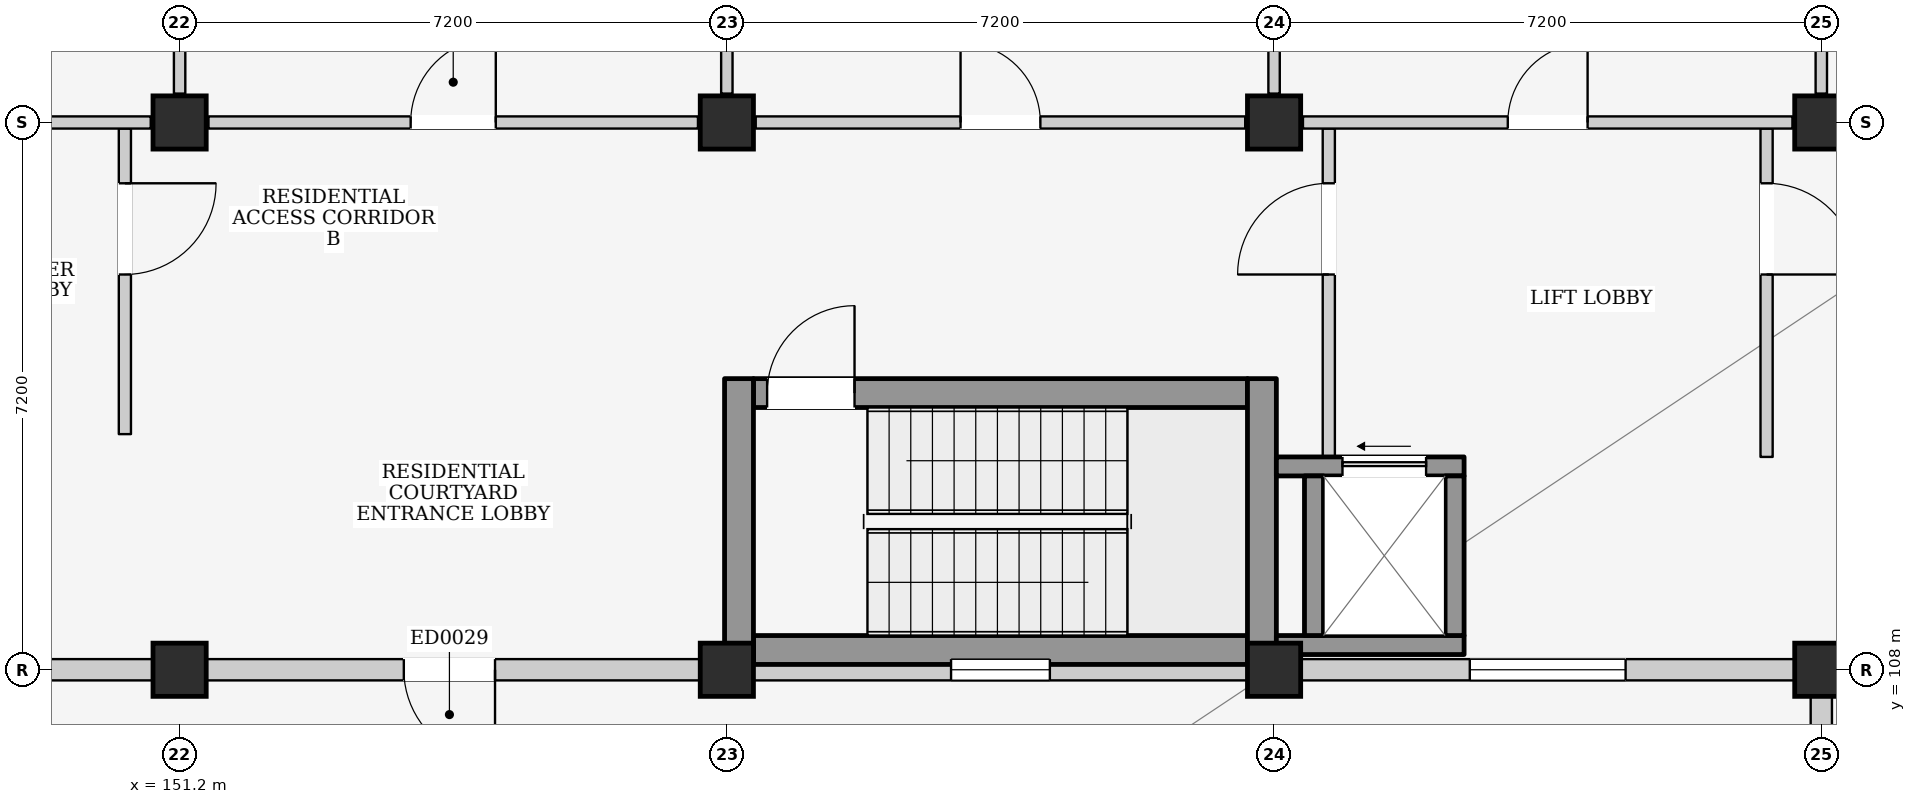
"""IFC4 building model, lengths in metres.
Left out: names, types, materials, properties, quantities, classifications, styles, units other than length and angle.
Written with IfcOpenShell. Run it as: python <this file> out.ifc"""

import sys

from ifc_helpers import new_model, si_unit, direction, frame, frame_2d, origin, origin_2d, place, context, subcontext, project, spatial, rectangle, extrude, element, fill, save


model = new_model("IFC4")
c1 = context("Model", 3, precision=1e-05, world=origin(), true_north=direction((0.0, 1.0)))
c2 = subcontext(c1, "Body", "Model", "MODEL_VIEW")
j1 = project(units=[si_unit("LENGTHUNIT", "METRE"), si_unit("PLANEANGLEUNIT", "RADIAN")], contexts=[c1])
p1 = place(None, origin())
s1 = spatial("IfcSite", under=j1, at=p1, CompositionType="ELEMENT")
p2 = place(p1, origin())
s2 = spatial("IfcBuilding", under=s1, at=p2, CompositionType="ELEMENT")
p3 = place(p2, origin())
s3 = spatial("IfcBuildingStorey", under=s2, at=p3, CompositionType="ELEMENT", Elevation=0.0)
for number, where, z_axis, x_axis in (
    (1, (151.2, 108.0, 0.0), (0.0, 0.0, 1.0), (1.0, 0.0, 0.0)),
    (2, (151.2, 115.2, 0.0), (0.0, 0.0, 1.0), (1.0, 0.0, 0.0)),
    (3, (158.4, 108.0, 0.0), (0.0, 0.0, 1.0), (1.0, 0.0, 0.0)),
    (4, (158.4, 115.2, 0.0), (0.0, 0.0, 1.0), (1.0, 0.0, 0.0)),
    (5, (165.6, 108.0, 0.0), (0.0, 0.0, 1.0), (1.0, 0.0, 0.0)),
    (6, (165.6, 115.2, 0.0), (0.0, 0.0, 1.0), (1.0, 0.0, 0.0)),
    (7, (172.8, 108.0, 0.0), (0.0, 0.0, 1.0), (1.0, 0.0, 0.0)),
    (8, (172.8, 115.2, 0.0), (0.0, 0.0, 1.0), (1.0, 0.0, 0.0)),
):
    element("IfcColumn", number, at=place(p3, frame(where, z_axis=z_axis, x_axis=x_axis)), inside=s3, PredefinedType="COLUMN", context=c2, shape_type="SweptSolid", body=[
        extrude(rectangle(XDim=0.7, YDim=0.7, at=origin_2d()), origin(), (0.0, 0.0, 1.0), 4.5),
    ])
p4 = place(p3, frame((144.35, 108.0, 0.0), z_axis=(0.0, 0.0, 1.0), x_axis=(1.0, 0.0, 0.0)))
e9 = element("IfcWall", 9, at=p4, inside=s3, PredefinedType="ELEMENTEDWALL", context=c2, shape_type="SweptSolid", body=[
    extrude(rectangle(XDim=6.5, YDim=0.28, at=frame_2d((3.25, 0.0))), origin(), (0.0, 0.0, 1.0), 3.435),
])
p5 = place(p4, frame((2.475, 0.0, 0.95)))
e10 = element("IfcOpeningElement", 10, at=p5, cuts=e9, PredefinedType="OPENING", context=c2, shape_type="SweptSolid", body=[
    extrude(rectangle(XDim=1.55, YDim=1.45, at=frame_2d((0.775, 0.725))), frame((0.0, 0.155, 0.0), z_axis=(0.0, -1.0, 0.0), x_axis=(1.0, 0.0, 0.0)), (0.0, 0.0, 1.0), 0.31),
])
p6 = place(p3, frame((151.55, 108.0, 0.0), z_axis=(0.0, 0.0, 1.0), x_axis=(1.0, 0.0, 0.0)))
e11 = element("IfcWall", 11, at=p6, inside=s3, PredefinedType="ELEMENTEDWALL", context=c2, shape_type="SweptSolid", body=[
    extrude(rectangle(XDim=6.5, YDim=0.28, at=frame_2d((3.25, 0.0))), origin(), (0.0, 0.0, 1.0), 3.435),
])
p7 = place(p6, frame((2.6, 0.0, 0.0)))
e12 = element("IfcOpeningElement", 12, at=p7, cuts=e11, PredefinedType="OPENING", context=c2, shape_type="SweptSolid", body=[
    extrude(rectangle(XDim=1.2, YDim=2.15, at=frame_2d((0.6, 1.075))), frame((0.0, 0.155, 0.0), z_axis=(0.0, -1.0, 0.0), x_axis=(1.0, 0.0, 0.0)), (0.0, 0.0, 1.0), 0.31),
])
p8 = place(p3, frame((158.75, 108.0, 0.0), z_axis=(0.0, 0.0, 1.0), x_axis=(1.0, 0.0, 0.0)))
e13 = element("IfcWall", 13, at=p8, inside=s3, PredefinedType="ELEMENTEDWALL", context=c2, shape_type="SweptSolid", body=[
    extrude(rectangle(XDim=6.5, YDim=0.28, at=frame_2d((3.25, 0.0))), origin(), (0.0, 0.0, 1.0), 3.435),
])
p9 = place(p8, frame((2.6, 0.0, 0.95)))
e14 = element("IfcOpeningElement", 14, at=p9, cuts=e13, PredefinedType="OPENING", context=c2, shape_type="SweptSolid", body=[
    extrude(rectangle(XDim=1.3, YDim=1.25, at=frame_2d((0.65, 0.625))), frame((0.0, 0.155, 0.0), z_axis=(0.0, -1.0, 0.0), x_axis=(1.0, 0.0, 0.0)), (0.0, 0.0, 1.0), 0.31),
])
p10 = place(p3, frame((165.95, 108.0, 0.0), z_axis=(0.0, 0.0, 1.0), x_axis=(1.0, 0.0, 0.0)))
e15 = element("IfcWall", 15, at=p10, inside=s3, PredefinedType="ELEMENTEDWALL", context=c2, shape_type="SweptSolid", body=[
    extrude(rectangle(XDim=6.5, YDim=0.28, at=frame_2d((3.25, 0.0))), origin(), (0.0, 0.0, 1.0), 3.435),
])
p11 = place(p10, frame((2.225, 0.0, 0.95)))
e16 = element("IfcOpeningElement", 16, at=p11, cuts=e15, PredefinedType="OPENING", context=c2, shape_type="SweptSolid", body=[
    extrude(rectangle(XDim=2.05, YDim=1.6, at=frame_2d((1.025, 0.8))), frame((0.0, 0.155, 0.0), z_axis=(0.0, -1.0, 0.0), x_axis=(1.0, 0.0, 0.0)), (0.0, 0.0, 1.0), 0.31),
])
p12 = place(p3, frame((172.8, 101.15, 0.0), z_axis=(0.0, 0.0, 1.0), x_axis=(0.0, 1.0, 0.0)))
e17 = element("IfcWall", 17, at=p12, inside=s3, PredefinedType="ELEMENTEDWALL", context=c2, shape_type="SweptSolid", body=[
    extrude(rectangle(XDim=6.5, YDim=0.28, at=frame_2d((3.25, 0.0))), origin(), (0.0, 0.0, 1.0), 3.435),
])
p13 = place(p12, frame((2.225, 0.0, 0.95)))
e18 = element("IfcOpeningElement", 18, at=p13, cuts=e17, PredefinedType="OPENING", context=c2, shape_type="SweptSolid", body=[
    extrude(rectangle(XDim=2.05, YDim=1.6, at=frame_2d((1.025, 0.8))), frame((0.0, 0.155, 0.0), z_axis=(0.0, -1.0, 0.0), x_axis=(1.0, 0.0, 0.0)), (0.0, 0.0, 1.0), 0.31),
])
p14 = place(p3, frame((150.48, 111.1, 0.0), z_axis=(0.0, 0.0, 1.0), x_axis=(0.0, 1.0, 0.0)))
e19 = element("IfcWall", 19, at=p14, inside=s3, PredefinedType="PARTITIONING", context=c2, shape_type="SweptSolid", body=[
    extrude(rectangle(XDim=4.02, YDim=0.16, at=frame_2d((2.01, 0.0))), origin(), (0.0, 0.0, 1.0), 4.2),
])
p15 = place(p14, frame((2.1, 0.0, 0.0)))
e20 = element("IfcOpeningElement", 20, at=p15, cuts=e19, PredefinedType="OPENING", context=c2, shape_type="SweptSolid", body=[
    extrude(rectangle(XDim=1.2, YDim=2.2, at=frame_2d((0.6, 1.1))), frame((0.0, 0.095, 0.0), z_axis=(0.0, -1.0, 0.0), x_axis=(1.0, 0.0, 0.0)), (0.0, 0.0, 1.0), 0.19),
])
p16 = place(p3, frame((158.75, 108.26, 0.0), z_axis=(0.0, 0.0, 1.0), x_axis=(1.0, 0.0, 0.0)))
e21 = element("IfcWall", 21, at=p16, inside=s3, PredefinedType="SHEAR", context=c2, shape_type="SweptSolid", body=[
    extrude(rectangle(XDim=6.5, YDim=0.38, at=frame_2d((3.25, 0.0))), origin(), (0.0, 0.0, 1.0), 4.2),
])
p17 = place(p3, frame((158.75, 111.64, 0.0), z_axis=(0.0, 0.0, 1.0), x_axis=(1.0, 0.0, 0.0)))
e22 = element("IfcWall", 22, at=p17, inside=s3, PredefinedType="SHEAR", context=c2, shape_type="SweptSolid", body=[
    extrude(rectangle(XDim=6.5, YDim=0.38, at=frame_2d((3.25, 0.0))), origin(), (0.0, 0.0, 1.0), 4.2),
])
p18 = place(p17, frame((0.18, 0.0, 0.0)))
e23 = element("IfcOpeningElement", 23, at=p18, cuts=e22, PredefinedType="OPENING", context=c2, shape_type="SweptSolid", body=[
    extrude(rectangle(XDim=1.15, YDim=2.2, at=frame_2d((0.575, 1.1))), frame((0.0, 0.205, 0.0), z_axis=(0.0, -1.0, 0.0), x_axis=(1.0, 0.0, 0.0)), (0.0, 0.0, 1.0), 0.41),
])
for number, where, z_axis, x_axis in (
    (24, (158.56, 108.07, 0.0), (0.0, 0.0, 1.0), (0.0, 1.0, 0.0)),
    (25, (165.44, 108.07, 0.0), (0.0, 0.0, 1.0), (0.0, 1.0, 0.0)),
):
    element("IfcWall", number, at=place(p3, frame(where, z_axis=z_axis, x_axis=x_axis)), inside=s3, PredefinedType="SHEAR", context=c2, shape_type="SweptSolid", body=[
        extrude(rectangle(XDim=3.76, YDim=0.38, at=frame_2d((1.88, 0.0))), origin(), (0.0, 0.0, 1.0), 4.2),
    ])
p19 = place(p3, frame((166.32, 110.8, 0.0), z_axis=(0.0, 0.0, 1.0), x_axis=(0.0, 1.0, 0.0)))
e26 = element("IfcWall", 26, at=p19, inside=s3, PredefinedType="PARTITIONING", context=c2, shape_type="SweptSolid", body=[
    extrude(rectangle(XDim=4.32, YDim=0.16, at=frame_2d((2.16, 0.0))), origin(), (0.0, 0.0, 1.0), 4.2),
])
p20 = place(p19, frame((2.4, 0.0, 0.0)))
e27 = element("IfcOpeningElement", 27, at=p20, cuts=e26, PredefinedType="OPENING", context=c2, shape_type="SweptSolid", body=[
    extrude(rectangle(XDim=1.2, YDim=2.2, at=frame_2d((0.6, 1.1))), frame((0.0, 0.095, 0.0), z_axis=(0.0, -1.0, 0.0), x_axis=(1.0, 0.0, 0.0)), (0.0, 0.0, 1.0), 0.19),
])
p21 = place(p3, frame((172.08, 110.8, 0.0), z_axis=(0.0, 0.0, 1.0), x_axis=(0.0, 1.0, 0.0)))
e28 = element("IfcWall", 28, at=p21, inside=s3, PredefinedType="PARTITIONING", context=c2, shape_type="SweptSolid", body=[
    extrude(rectangle(XDim=4.32, YDim=0.16, at=frame_2d((2.16, 0.0))), origin(), (0.0, 0.0, 1.0), 4.2),
])
p22 = place(p21, frame((2.4, 0.0, 0.0)))
e29 = element("IfcOpeningElement", 29, at=p22, cuts=e28, PredefinedType="OPENING", context=c2, shape_type="SweptSolid", body=[
    extrude(rectangle(XDim=1.2, YDim=2.2, at=frame_2d((0.6, 1.1))), frame((0.0, 0.095, 0.0), z_axis=(0.0, -1.0, 0.0), x_axis=(1.0, 0.0, 0.0)), (0.0, 0.0, 1.0), 0.19),
])
p23 = place(p3, frame((165.63, 108.325, 0.0), z_axis=(0.0, 0.0, 1.0), x_axis=(1.0, 0.0, 0.0)))
e30 = element("IfcWall", 30, at=p23, inside=s3, PredefinedType="SHEAR", context=c2, shape_type="SweptSolid", body=[
    extrude(rectangle(XDim=2.47, YDim=0.25, at=frame_2d((1.235, 0.0))), origin(), (0.0, 0.0, 1.0), 4.2),
])
p24 = place(p3, frame((165.63, 110.675, 0.0), z_axis=(0.0, 0.0, 1.0), x_axis=(1.0, 0.0, 0.0)))
e31 = element("IfcWall", 31, at=p24, inside=s3, PredefinedType="SHEAR", context=c2, shape_type="SweptSolid", body=[
    extrude(rectangle(XDim=2.47, YDim=0.25, at=frame_2d((1.235, 0.0))), origin(), (0.0, 0.0, 1.0), 4.2),
])
p25 = place(p24, frame((0.87, 0.0, 0.0)))
e32 = element("IfcOpeningElement", 32, at=p25, cuts=e31, PredefinedType="OPENING", context=c2, shape_type="SweptSolid", body=[
    extrude(rectangle(XDim=1.1, YDim=2.15, at=frame_2d((0.55, 1.075))), frame((0.0, 0.14, 0.0), z_axis=(0.0, -1.0, 0.0), x_axis=(1.0, 0.0, 0.0)), (0.0, 0.0, 1.0), 0.28),
])
for number, where, z_axis, x_axis in (
    (33, (166.125, 108.45, 0.0), (0.0, 0.0, 1.0), (0.0, 1.0, 0.0)),
    (34, (167.975, 108.45, 0.0), (0.0, 0.0, 1.0), (0.0, 1.0, 0.0)),
):
    element("IfcWall", number, at=place(p3, frame(where, z_axis=z_axis, x_axis=x_axis)), inside=s3, PredefinedType="SHEAR", context=c2, shape_type="SweptSolid", body=[
        extrude(rectangle(XDim=2.1, YDim=0.25, at=frame_2d((1.05, 0.0))), origin(), (0.0, 0.0, 1.0), 4.2),
    ])
p26 = place(p3, frame((144.38, 115.2, 0.0), z_axis=(0.0, 0.0, 1.0), x_axis=(1.0, 0.0, 0.0)))
e35 = element("IfcWall", 35, at=p26, inside=s3, PredefinedType="PARTITIONING", context=c2, shape_type="SweptSolid", body=[
    extrude(rectangle(XDim=6.44, YDim=0.16, at=frame_2d((3.22, 0.0))), origin(), (0.0, 0.0, 1.0), 3.435),
])
p27 = place(p26, frame((2.66, 0.0, 0.0)))
e36 = element("IfcOpeningElement", 36, at=p27, cuts=e35, PredefinedType="OPENING", context=c2, shape_type="SweptSolid", body=[
    extrude(rectangle(XDim=1.12, YDim=2.2, at=frame_2d((0.56, 1.1))), frame((0.0, 0.095, 0.0), z_axis=(0.0, -1.0, 0.0), x_axis=(1.0, 0.0, 0.0)), (0.0, 0.0, 1.0), 0.19),
])
p28 = place(p3, frame((151.2, 115.58, 0.0), z_axis=(0.0, 0.0, 1.0), x_axis=(0.0, 1.0, 0.0)))
e37 = element("IfcWall", 37, at=p28, inside=s3, PredefinedType="PARTITIONING", context=c2, shape_type="SweptSolid", body=[
    extrude(rectangle(XDim=6.44, YDim=0.15, at=frame_2d((3.22, 0.0))), origin(), (0.0, 0.0, 1.0), 3.435),
])
p29 = place(p3, frame((151.58, 115.2, 0.0), z_axis=(0.0, 0.0, 1.0), x_axis=(1.0, 0.0, 0.0)))
e38 = element("IfcWall", 38, at=p29, inside=s3, PredefinedType="PARTITIONING", context=c2, shape_type="SweptSolid", body=[
    extrude(rectangle(XDim=6.44, YDim=0.16, at=frame_2d((3.22, 0.0))), origin(), (0.0, 0.0, 1.0), 3.435),
])
p30 = place(p29, frame((2.66, 0.0, 0.0)))
e39 = element("IfcOpeningElement", 39, at=p30, cuts=e38, PredefinedType="OPENING", context=c2, shape_type="SweptSolid", body=[
    extrude(rectangle(XDim=1.12, YDim=2.2, at=frame_2d((0.56, 1.1))), frame((0.0, 0.095, 0.0), z_axis=(0.0, -1.0, 0.0), x_axis=(1.0, 0.0, 0.0)), (0.0, 0.0, 1.0), 0.19),
])
p31 = place(p3, frame((158.4, 115.58, 0.0), z_axis=(0.0, 0.0, 1.0), x_axis=(0.0, 1.0, 0.0)))
e40 = element("IfcWall", 40, at=p31, inside=s3, PredefinedType="PARTITIONING", context=c2, shape_type="SweptSolid", body=[
    extrude(rectangle(XDim=6.44, YDim=0.15, at=frame_2d((3.22, 0.0))), origin(), (0.0, 0.0, 1.0), 3.435),
])
p32 = place(p3, frame((158.78, 115.2, 0.0), z_axis=(0.0, 0.0, 1.0), x_axis=(1.0, 0.0, 0.0)))
e41 = element("IfcWall", 41, at=p32, inside=s3, PredefinedType="PARTITIONING", context=c2, shape_type="SweptSolid", body=[
    extrude(rectangle(XDim=6.44, YDim=0.16, at=frame_2d((3.22, 0.0))), origin(), (0.0, 0.0, 1.0), 3.435),
])
p33 = place(p32, frame((2.695, 0.0, 0.0)))
e42 = element("IfcOpeningElement", 42, at=p33, cuts=e41, PredefinedType="OPENING", context=c2, shape_type="SweptSolid", body=[
    extrude(rectangle(XDim=1.05, YDim=2.15, at=frame_2d((0.525, 1.075))), frame((0.0, 0.095, 0.0), z_axis=(0.0, -1.0, 0.0), x_axis=(1.0, 0.0, 0.0)), (0.0, 0.0, 1.0), 0.19),
])
p34 = place(p3, frame((165.6, 115.58, 0.0), z_axis=(0.0, 0.0, 1.0), x_axis=(0.0, 1.0, 0.0)))
e43 = element("IfcWall", 43, at=p34, inside=s3, PredefinedType="PARTITIONING", context=c2, shape_type="SweptSolid", body=[
    extrude(rectangle(XDim=6.44, YDim=0.15, at=frame_2d((3.22, 0.0))), origin(), (0.0, 0.0, 1.0), 3.435),
])
p35 = place(p3, frame((165.98, 115.2, 0.0), z_axis=(0.0, 0.0, 1.0), x_axis=(1.0, 0.0, 0.0)))
e44 = element("IfcWall", 44, at=p35, inside=s3, PredefinedType="PARTITIONING", context=c2, shape_type="SweptSolid", body=[
    extrude(rectangle(XDim=6.44, YDim=0.16, at=frame_2d((3.22, 0.0))), origin(), (0.0, 0.0, 1.0), 3.435),
])
p36 = place(p35, frame((2.695, 0.0, 0.0)))
e45 = element("IfcOpeningElement", 45, at=p36, cuts=e44, PredefinedType="OPENING", context=c2, shape_type="SweptSolid", body=[
    extrude(rectangle(XDim=1.05, YDim=2.15, at=frame_2d((0.525, 1.075))), frame((0.0, 0.095, 0.0), z_axis=(0.0, -1.0, 0.0), x_axis=(1.0, 0.0, 0.0)), (0.0, 0.0, 1.0), 0.19),
])
p37 = place(p3, frame((172.8, 115.58, 0.0), z_axis=(0.0, 0.0, 1.0), x_axis=(0.0, 1.0, 0.0)))
e46 = element("IfcWall", 46, at=p37, inside=s3, PredefinedType="PARTITIONING", context=c2, shape_type="SweptSolid", body=[
    extrude(rectangle(XDim=6.44, YDim=0.15, at=frame_2d((3.22, 0.0))), origin(), (0.0, 0.0, 1.0), 3.435),
])
p38 = place(p7, frame((1.2, 0.0, 0.0), z_axis=(0.0, 0.0, 1.0), x_axis=(-1.0, 0.0, 0.0)))
e47 = element("IfcDoor", 47, at=p38, inside=s3, OperationType="SINGLE_SWING_LEFT", PredefinedType="DOOR", context=c2, shape_type="SweptSolid", body=[
    extrude(rectangle(XDim=1.2, YDim=2.15, at=frame_2d((0.6, 1.075))), frame((0.0, 0.025, 0.0), z_axis=(0.0, -1.0, 0.0), x_axis=(1.0, 0.0, 0.0)), (0.0, 0.0, 1.0), 0.05),
])
fill(e12, e47)
p39 = place(p9, origin())
e48 = element("IfcWindow", 48, at=p39, inside=s3, PartitioningType="SINGLE_PANEL", PredefinedType="WINDOW", context=c2, shape_type="SweptSolid", body=[
    extrude(rectangle(XDim=1.3, YDim=1.25, at=frame_2d((0.65, 0.625))), frame((0.0, 0.03, 0.0), z_axis=(0.0, -1.0, 0.0), x_axis=(1.0, 0.0, 0.0)), (0.0, 0.0, 1.0), 0.06),
])
fill(e14, e48)
p40 = place(p11, origin())
e49 = element("IfcWindow", 49, at=p40, inside=s3, PartitioningType="DOUBLE_PANEL_VERTICAL", PredefinedType="WINDOW", context=c2, shape_type="SweptSolid", body=[
    extrude(rectangle(XDim=2.05, YDim=1.6, at=frame_2d((1.025, 0.8))), frame((0.0, 0.03, 0.0), z_axis=(0.0, -1.0, 0.0), x_axis=(1.0, 0.0, 0.0)), (0.0, 0.0, 1.0), 0.06),
])
fill(e16, e49)
p41 = place(p15, frame((1.2, 0.0, 0.0), z_axis=(0.0, 0.0, 1.0), x_axis=(-1.0, 0.0, 0.0)))
e50 = element("IfcDoor", 50, at=p41, inside=s3, OperationType="SINGLE_SWING_LEFT", PredefinedType="DOOR", context=c2, shape_type="SweptSolid", body=[
    extrude(rectangle(XDim=1.2, YDim=2.2, at=frame_2d((0.6, 1.1))), frame((0.0, 0.025, 0.0), z_axis=(0.0, -1.0, 0.0), x_axis=(1.0, 0.0, 0.0)), (0.0, 0.0, 1.0), 0.05),
])
fill(e20, e50)
p42 = place(p18, origin())
e51 = element("IfcDoor", 51, at=p42, inside=s3, OperationType="SINGLE_SWING_RIGHT", PredefinedType="DOOR", context=c2, shape_type="SweptSolid", body=[
    extrude(rectangle(XDim=1.15, YDim=2.2, at=frame_2d((0.575, 1.1))), frame((0.0, 0.025, 0.0), z_axis=(0.0, -1.0, 0.0), x_axis=(1.0, 0.0, 0.0)), (0.0, 0.0, 1.0), 0.05),
])
fill(e23, e51)
p43 = place(p20, origin())
e52 = element("IfcDoor", 52, at=p43, inside=s3, OperationType="SINGLE_SWING_LEFT", PredefinedType="DOOR", context=c2, shape_type="SweptSolid", body=[
    extrude(rectangle(XDim=1.2, YDim=2.2, at=frame_2d((0.6, 1.1))), frame((0.0, 0.025, 0.0), z_axis=(0.0, -1.0, 0.0), x_axis=(1.0, 0.0, 0.0)), (0.0, 0.0, 1.0), 0.05),
])
fill(e27, e52)
p44 = place(p22, frame((1.2, 0.0, 0.0), z_axis=(0.0, 0.0, 1.0), x_axis=(-1.0, 0.0, 0.0)))
e53 = element("IfcDoor", 53, at=p44, inside=s3, OperationType="SINGLE_SWING_RIGHT", PredefinedType="DOOR", context=c2, shape_type="SweptSolid", body=[
    extrude(rectangle(XDim=1.2, YDim=2.2, at=frame_2d((0.6, 1.1))), frame((0.0, 0.025, 0.0), z_axis=(0.0, -1.0, 0.0), x_axis=(1.0, 0.0, 0.0)), (0.0, 0.0, 1.0), 0.05),
])
fill(e29, e53)
p45 = place(p25, origin())
e54 = element("IfcDoor", 54, at=p45, inside=s3, OperationType="SLIDING_TO_LEFT", PredefinedType="DOOR", context=c2, shape_type="SweptSolid", body=[
    extrude(rectangle(XDim=1.1, YDim=2.15, at=frame_2d((0.55, 1.075))), frame((0.0, 0.025, 0.0), z_axis=(0.0, -1.0, 0.0), x_axis=(1.0, 0.0, 0.0)), (0.0, 0.0, 1.0), 0.05),
])
fill(e32, e54)
p46 = place(p30, origin())
e55 = element("IfcDoor", 55, at=p46, inside=s3, OperationType="SINGLE_SWING_RIGHT", PredefinedType="DOOR", context=c2, shape_type="SweptSolid", body=[
    extrude(rectangle(XDim=1.12, YDim=2.2, at=frame_2d((0.56, 1.1))), frame((0.0, 0.025, 0.0), z_axis=(0.0, -1.0, 0.0), x_axis=(1.0, 0.0, 0.0)), (0.0, 0.0, 1.0), 0.05),
])
fill(e39, e55)
p47 = place(p33, origin())
e56 = element("IfcDoor", 56, at=p47, inside=s3, OperationType="SINGLE_SWING_LEFT", PredefinedType="DOOR", context=c2, shape_type="SweptSolid", body=[
    extrude(rectangle(XDim=1.05, YDim=2.15, at=frame_2d((0.525, 1.075))), frame((0.0, 0.025, 0.0), z_axis=(0.0, -1.0, 0.0), x_axis=(1.0, 0.0, 0.0)), (0.0, 0.0, 1.0), 0.05),
])
fill(e42, e56)
p48 = place(p36, origin())
e57 = element("IfcDoor", 57, at=p48, inside=s3, OperationType="SINGLE_SWING_RIGHT", PredefinedType="DOOR", context=c2, shape_type="SweptSolid", body=[
    extrude(rectangle(XDim=1.05, YDim=2.15, at=frame_2d((0.525, 1.075))), frame((0.0, 0.025, 0.0), z_axis=(0.0, -1.0, 0.0), x_axis=(1.0, 0.0, 0.0)), (0.0, 0.0, 1.0), 0.05),
])
fill(e45, e57)
save(model, sys.argv[1])
